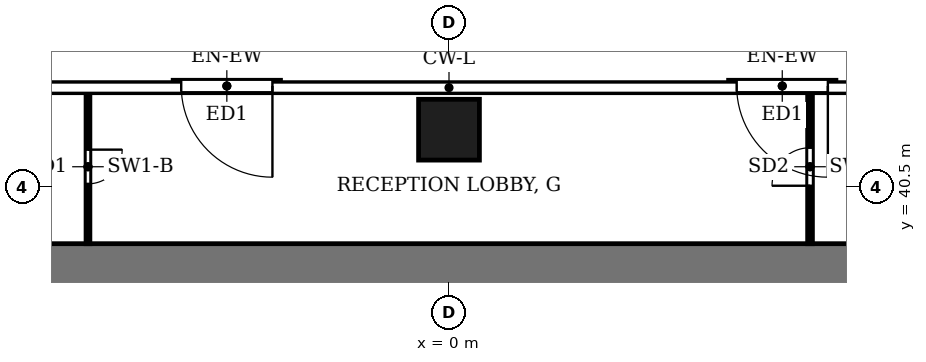
"""IFC4 building model, lengths in metres.
Left out: names, types, materials, properties, quantities, classifications, styles, units other than length and angle.
Written with IfcOpenShell. Run it as: python <this file> out.ifc"""

import sys

from ifc_helpers import new_model, si_unit, direction, frame, frame_2d, origin, origin_2d, place, context, subcontext, project, spatial, rectangle, hollow_rectangle, extrude, element, fill, save


model = new_model("IFC4")
c1 = context("Model", 3, precision=1e-05, world=origin(), true_north=direction((0.0, 1.0)))
c2 = subcontext(c1, "Body", "Model", "MODEL_VIEW")
j1 = project(units=[si_unit("LENGTHUNIT", "METRE"), si_unit("PLANEANGLEUNIT", "RADIAN")], contexts=[c1])
p1 = place(None, origin())
s1 = spatial("IfcSite", under=j1, at=p1, CompositionType="ELEMENT")
p2 = place(p1, origin())
s2 = spatial("IfcBuilding", under=s1, at=p2, CompositionType="ELEMENT")
p3 = place(p2, origin())
s3 = spatial("IfcBuildingStorey", under=s2, at=p3, CompositionType="ELEMENT", Elevation=0.0)
p4 = place(p3, frame((-14.0, 38.3, -0.45), z_axis=(0.0, 0.0, 1.0), x_axis=(1.0, 0.0, 0.0)))
e1 = element("IfcWall", 1, at=p4, inside=s3, PredefinedType="SHEAR", context=c2, shape_type="SweptSolid", body=[
    extrude(rectangle(XDim=28.0, YDim=1.4, at=frame_2d((14.0, 0.0))), origin(), (0.0, 0.0, 1.0), 9.32),
])
p5 = place(p3, frame((0.0, 42.0, 0.0), z_axis=(0.0, 0.0, 1.0), x_axis=(1.0, 0.0, 0.0)))
e2 = element("IfcColumn", 2, at=p5, inside=s3, PredefinedType="COLUMN", context=c2, shape_type="SweptSolid", body=[
    extrude(hollow_rectangle(XDim=1.6, YDim=1.6, WallThickness=0.09, at=origin_2d()), origin(), (0.0, 0.0, 1.0), 9.0),
])
p6 = place(p3, frame((10.181, 43.15, 0.0), z_axis=(0.0, 0.0, 1.0), x_axis=(-1.0, 0.0, 0.0)))
e3 = element("IfcWall", 3, at=p6, inside=s3, PredefinedType="SOLIDWALL", context=c2, shape_type="SweptSolid", body=[
    extrude(rectangle(XDim=2.823, YDim=0.3, at=frame_2d((1.412, 0.0))), origin(), (0.0, 0.0, 1.0), 3.11),
])
p7 = place(p6, frame((0.211, 0.0, 0.0)))
e4 = element("IfcOpeningElement", 4, at=p7, cuts=e3, PredefinedType="OPENING", context=c2, shape_type="SweptSolid", body=[
    extrude(rectangle(XDim=2.4, YDim=2.7, at=frame_2d((1.2, 1.35))), frame((0.0, 0.16, 0.0), z_axis=(0.0, -1.0, 0.0), x_axis=(1.0, 0.0, 0.0)), (0.0, 0.0, 1.0), 0.32),
])
p8 = place(p3, frame((-4.435, 43.15, 0.0), z_axis=(0.0, 0.0, 1.0), x_axis=(-1.0, 0.0, 0.0)))
e5 = element("IfcWall", 5, at=p8, inside=s3, PredefinedType="SOLIDWALL", context=c2, shape_type="SweptSolid", body=[
    extrude(rectangle(XDim=2.823, YDim=0.3, at=frame_2d((1.412, 0.0))), origin(), (0.0, 0.0, 1.0), 3.11),
])
p9 = place(p8, frame((0.211, 0.0, 0.0)))
e6 = element("IfcOpeningElement", 6, at=p9, cuts=e5, PredefinedType="OPENING", context=c2, shape_type="SweptSolid", body=[
    extrude(rectangle(XDim=2.4, YDim=2.7, at=frame_2d((1.2, 1.35))), frame((0.0, 0.16, 0.0), z_axis=(0.0, -1.0, 0.0), x_axis=(1.0, 0.0, 0.0)), (0.0, 0.0, 1.0), 0.32),
])
p10 = place(p3, frame((-9.5, 43.05, 0.0), z_axis=(0.0, 0.0, 1.0), x_axis=(0.0, -1.0, 0.0)))
e7 = element("IfcWall", 7, at=p10, inside=s3, PredefinedType="PARTITIONING", context=c2, shape_type="SweptSolid", body=[
    extrude(rectangle(XDim=4.05, YDim=0.1, at=frame_2d((2.025, 0.0))), origin(), (0.0, 0.0, 1.0), 8.87),
])
p11 = place(p10, frame((1.575, 0.0, 0.0)))
e8 = element("IfcOpeningElement", 8, at=p11, cuts=e7, PredefinedType="OPENING", context=c2, shape_type="SweptSolid", body=[
    extrude(rectangle(XDim=0.9, YDim=2.1, at=frame_2d((0.45, 1.05))), frame((0.0, 0.06, 0.0), z_axis=(0.0, -1.0, 0.0), x_axis=(1.0, 0.0, 0.0)), (0.0, 0.0, 1.0), 0.12),
])
p12 = place(p3, frame((9.5, 39.0, 0.0), z_axis=(0.0, 0.0, 1.0), x_axis=(0.0, 1.0, 0.0)))
e9 = element("IfcWall", 9, at=p12, inside=s3, PredefinedType="PARTITIONING", context=c2, shape_type="SweptSolid", body=[
    extrude(rectangle(XDim=4.05, YDim=0.125, at=frame_2d((2.025, 0.0))), origin(), (0.0, 0.0, 1.0), 8.87),
])
p13 = place(p12, frame((1.525, 0.0, 0.0)))
e10 = element("IfcOpeningElement", 10, at=p13, cuts=e9, PredefinedType="OPENING", context=c2, shape_type="SweptSolid", body=[
    extrude(rectangle(XDim=1.0, YDim=2.1, at=frame_2d((0.5, 1.05))), frame((0.0, 0.073, 0.0), z_axis=(0.0, -1.0, 0.0), x_axis=(1.0, 0.0, 0.0)), (0.0, 0.0, 1.0), 0.145),
])
p14 = place(p7, origin())
e11 = element("IfcDoor", 11, at=p14, inside=s3, OperationType="DOUBLE_DOOR_SINGLE_SWING", PredefinedType="DOOR", context=c2, shape_type="SweptSolid", body=[
    extrude(rectangle(XDim=2.4, YDim=2.7, at=frame_2d((1.2, 1.35))), frame((0.0, 0.025, 0.0), z_axis=(0.0, -1.0, 0.0), x_axis=(1.0, 0.0, 0.0)), (0.0, 0.0, 1.0), 0.05),
])
fill(e4, e11)
p15 = place(p9, origin())
e12 = element("IfcDoor", 12, at=p15, inside=s3, OperationType="DOUBLE_DOOR_SINGLE_SWING", PredefinedType="DOOR", context=c2, shape_type="SweptSolid", body=[
    extrude(rectangle(XDim=2.4, YDim=2.7, at=frame_2d((1.2, 1.35))), frame((0.0, 0.025, 0.0), z_axis=(0.0, -1.0, 0.0), x_axis=(1.0, 0.0, 0.0)), (0.0, 0.0, 1.0), 0.05),
])
fill(e6, e12)
p16 = place(p11, origin())
e13 = element("IfcDoor", 13, at=p16, inside=s3, OperationType="SINGLE_SWING_LEFT", PredefinedType="DOOR", context=c2, shape_type="SweptSolid", body=[
    extrude(rectangle(XDim=0.9, YDim=2.1, at=frame_2d((0.45, 1.05))), frame((0.0, 0.025, 0.0), z_axis=(0.0, -1.0, 0.0), x_axis=(1.0, 0.0, 0.0)), (0.0, 0.0, 1.0), 0.05),
])
fill(e8, e13)
p17 = place(p13, origin())
e14 = element("IfcDoor", 14, at=p17, inside=s3, OperationType="SINGLE_SWING_RIGHT", PredefinedType="DOOR", context=c2, shape_type="SweptSolid", body=[
    extrude(rectangle(XDim=1.0, YDim=2.1, at=frame_2d((0.5, 1.05))), frame((0.0, 0.025, 0.0), z_axis=(0.0, -1.0, 0.0), x_axis=(1.0, 0.0, 0.0)), (0.0, 0.0, 1.0), 0.05),
])
fill(e10, e14)
save(model, sys.argv[1])
